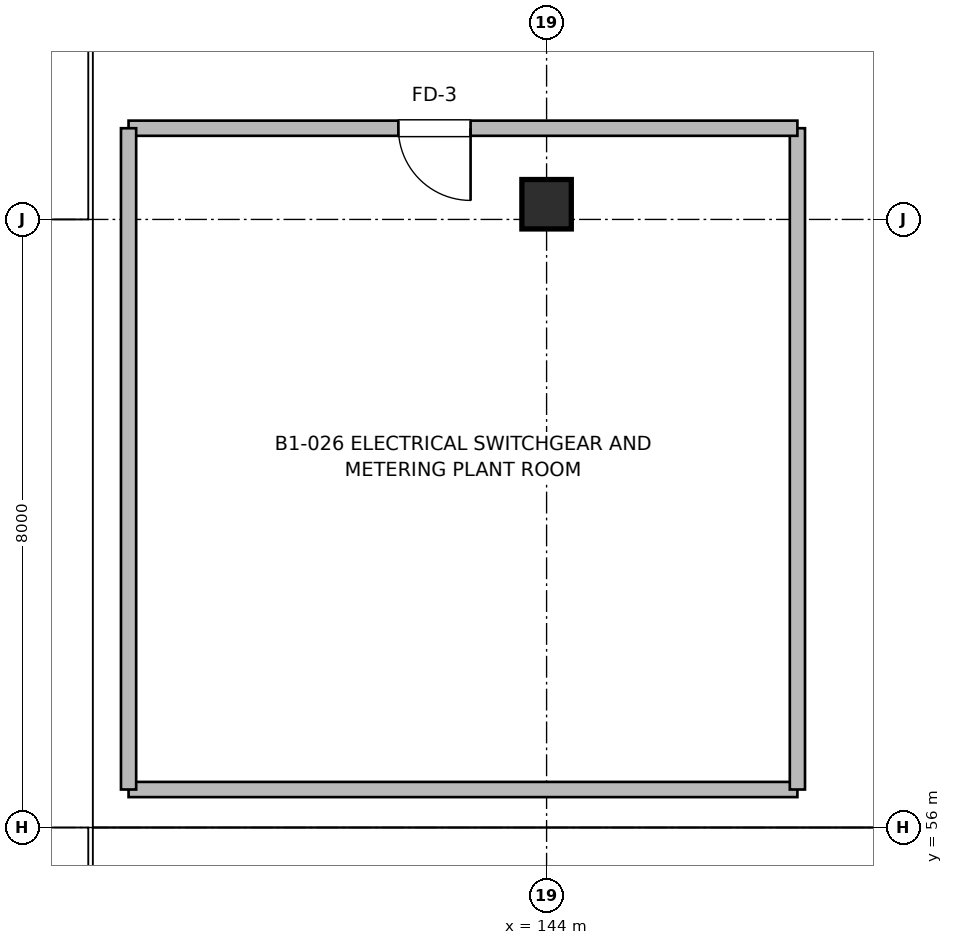
"""IFC4 building model, lengths in metres.
Left out: names, types, materials, properties, quantities, classifications, styles, units other than length and angle.
Written with IfcOpenShell. Run it as: python <this file> out.ifc"""

import sys

from ifc_helpers import new_model, si_unit, direction, frame, frame_2d, origin, origin_2d, place, context, subcontext, project, spatial, rectangle, extrude, element, fill, save


model = new_model("IFC4")
c1 = context("Model", 3, precision=1e-05, world=origin(), true_north=direction((0.0, 1.0)))
c2 = subcontext(c1, "Body", "Model", "MODEL_VIEW")
j1 = project(units=[si_unit("LENGTHUNIT", "METRE"), si_unit("PLANEANGLEUNIT", "RADIAN")], contexts=[c1])
p1 = place(None, origin())
s1 = spatial("IfcSite", under=j1, at=p1, CompositionType="ELEMENT")
p2 = place(p1, origin())
s2 = spatial("IfcBuilding", under=s1, at=p2, CompositionType="ELEMENT")
p3 = place(p2, frame((0.0, 0.0, -3.84)))
s3 = spatial("IfcBuildingStorey", under=s2, at=p3, CompositionType="ELEMENT", Elevation=-3.84)
p4 = place(p3, frame((144.0, 64.2, 0.0), z_axis=(0.0, 0.0, 1.0), x_axis=(1.0, 0.0, 0.0)))
e1 = element("IfcColumn", 1, at=p4, inside=s3, PredefinedType="COLUMN", context=c2, shape_type="SweptSolid", body=[
    extrude(rectangle(XDim=0.65, YDim=0.65, at=origin_2d()), origin(), (0.0, 0.0, 1.0), 3.84),
])
p5 = place(p3, frame((138.5, 56.5, 0.0), z_axis=(0.0, 0.0, 1.0), x_axis=(1.0, 0.0, 0.0)))
e2 = element("IfcWall", 2, at=p5, inside=s3, PredefinedType="SOLIDWALL", context=c2, shape_type="SweptSolid", body=[
    extrude(rectangle(XDim=8.8, YDim=0.2, at=frame_2d((4.4, 0.0))), origin(), (0.0, 0.0, 1.0), 3.52),
])
p6 = place(p3, frame((147.3, 56.5, 0.0), z_axis=(0.0, 0.0, 1.0), x_axis=(0.0, 1.0, 0.0)))
e3 = element("IfcWall", 3, at=p6, inside=s3, PredefinedType="SOLIDWALL", context=c2, shape_type="SweptSolid", body=[
    extrude(rectangle(XDim=8.7, YDim=0.2, at=frame_2d((4.35, 0.0))), origin(), (0.0, 0.0, 1.0), 3.52),
])
p7 = place(p3, frame((147.3, 65.2, 0.0), z_axis=(0.0, 0.0, 1.0), x_axis=(-1.0, 0.0, 0.0)))
e4 = element("IfcWall", 4, at=p7, inside=s3, PredefinedType="SOLIDWALL", context=c2, shape_type="SweptSolid", body=[
    extrude(rectangle(XDim=8.8, YDim=0.2, at=frame_2d((4.4, 0.0))), origin(), (0.0, 0.0, 1.0), 3.52),
])
p8 = place(p7, frame((4.3, 0.0, 0.0)))
e5 = element("IfcOpeningElement", 5, at=p8, cuts=e4, PredefinedType="OPENING", context=c2, shape_type="SweptSolid", body=[
    extrude(rectangle(XDim=0.95, YDim=2.1, at=frame_2d((0.475, 1.05))), frame((0.0, 0.11, 0.0), z_axis=(0.0, -1.0, 0.0), x_axis=(1.0, 0.0, 0.0)), (0.0, 0.0, 1.0), 0.22),
])
p9 = place(p3, frame((138.5, 65.2, 0.0), z_axis=(0.0, 0.0, 1.0), x_axis=(0.0, -1.0, 0.0)))
e6 = element("IfcWall", 6, at=p9, inside=s3, PredefinedType="SOLIDWALL", context=c2, shape_type="SweptSolid", body=[
    extrude(rectangle(XDim=8.7, YDim=0.2, at=frame_2d((4.35, 0.0))), origin(), (0.0, 0.0, 1.0), 3.52),
])
p10 = place(p8, origin())
e7 = element("IfcDoor", 7, at=p10, inside=s3, OperationType="SINGLE_SWING_LEFT", PredefinedType="DOOR", context=c2, shape_type="SweptSolid", body=[
    extrude(rectangle(XDim=0.95, YDim=2.1, at=frame_2d((0.475, 1.05))), frame((0.0, 0.025, 0.0), z_axis=(0.0, -1.0, 0.0), x_axis=(1.0, 0.0, 0.0)), (0.0, 0.0, 1.0), 0.05),
])
fill(e5, e7)
save(model, sys.argv[1])
